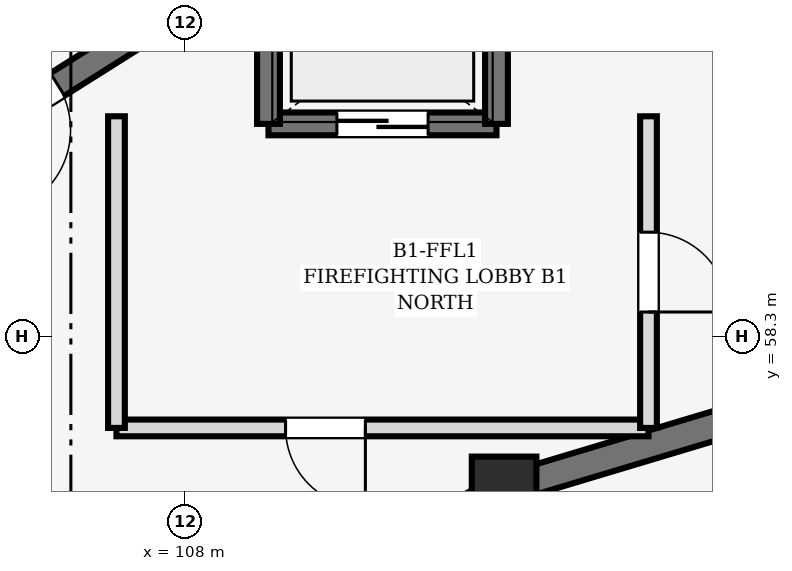
"""IFC4 building model, lengths in metres.
Left out: names, types, materials, properties, quantities, classifications, styles, units other than length and angle.
Written with IfcOpenShell. Run it as: python <this file> out.ifc"""

import sys

from ifc_helpers import new_model, si_unit, direction, frame, frame_2d, origin, origin_2d, place, context, subcontext, project, spatial, rectangle, extrude, element, fill, save


model = new_model("IFC4")
c1 = context("Model", 3, precision=1e-05, world=origin(), true_north=direction((0.0, 1.0)))
c2 = subcontext(c1, "Body", "Model", "MODEL_VIEW")
j1 = project(units=[si_unit("LENGTHUNIT", "METRE"), si_unit("PLANEANGLEUNIT", "RADIAN")], contexts=[c1])
p1 = place(None, origin())
s1 = spatial("IfcSite", under=j1, at=p1, CompositionType="ELEMENT")
p2 = place(p1, origin())
s2 = spatial("IfcBuilding", under=s1, at=p2, CompositionType="ELEMENT")
p3 = place(p2, frame((0.0, 0.0, -4.8)))
s3 = spatial("IfcBuildingStorey", under=s2, at=p3, CompositionType="ELEMENT", Elevation=-4.8)
p4 = place(p3, frame((112.2, 56.298, 0.0), z_axis=(0.0, 0.0, 1.0), x_axis=(1.0, 0.0, 0.0)))
e1 = element("IfcColumn", 1, at=p4, inside=s3, PredefinedType="COLUMN", context=c2, shape_type="SweptSolid", body=[
    extrude(rectangle(XDim=0.85, YDim=0.85, at=origin_2d()), origin(), (0.0, 0.0, 1.0), 4.8),
])
p5 = place(p3, frame((116.774, 57.67, 0.0), z_axis=(0.0, 0.0, 1.0), x_axis=(-0.957804976592, -0.287418904764, 0.0)))
e2 = element("IfcWall", 2, at=p5, inside=s3, PredefinedType="SOLIDWALL", context=c2, shape_type="SweptSolid", body=[
    extrude(rectangle(XDim=4.415, YDim=0.38, at=frame_2d((2.208, 0.0))), origin(), (0.0, 0.0, 1.0), 4.48),
])
p6 = place(p3, frame((111.885, 56.123, 0.0), z_axis=(0.0, 0.0, 1.0), x_axis=(-0.874000773635, -0.485924528795, 0.0)))
e3 = element("IfcWall", 3, at=p6, inside=s3, PredefinedType="SOLIDWALL", context=c2, shape_type="SweptSolid", body=[
    extrude(rectangle(XDim=3.975, YDim=0.38, at=frame_2d((1.987, 0.0))), origin(), (0.0, 0.0, 1.0), 4.48),
])
p7 = place(p6, frame((1.457, 0.0, 0.0)))
e4 = element("IfcOpeningElement", 4, at=p7, cuts=e3, PredefinedType="OPENING", context=c2, shape_type="SweptSolid", body=[
    extrude(rectangle(XDim=1.06, YDim=2.24, at=frame_2d((0.53, 1.12))), frame((0.0, 0.202, 0.0), z_axis=(0.0, -1.0, 0.0), x_axis=(1.0, 0.0, 0.0)), (0.0, 0.0, 1.0), 0.404),
])
p8 = place(p3, frame((108.346, 62.893, 0.0), z_axis=(0.0, 0.0, 1.0), x_axis=(-0.846151979506, -0.532941673712, 0.0)))
e5 = element("IfcWall", 5, at=p8, inside=s3, PredefinedType="SHEAR", context=c2, shape_type="SweptSolid", body=[
    extrude(rectangle(XDim=5.9, YDim=0.35, at=frame_2d((2.95, 0.0))), origin(), (0.0, 0.0, 1.0), 4.48),
])
p9 = place(p8, frame((2.39, 0.0, 0.0)))
e6 = element("IfcOpeningElement", 6, at=p9, cuts=e5, PredefinedType="OPENING", context=c2, shape_type="SweptSolid", body=[
    extrude(rectangle(XDim=1.12, YDim=2.26, at=frame_2d((0.56, 1.13))), frame((0.0, 0.187, 0.0), z_axis=(0.0, -1.0, 0.0), x_axis=(1.0, 0.0, 0.0)), (0.0, 0.0, 1.0), 0.374),
])
p10 = place(p3, frame((112.1, 61.1, 0.0), z_axis=(0.0, 0.0, 1.0), x_axis=(-1.0, 0.0, 0.0)))
e7 = element("IfcWall", 7, at=p10, inside=s3, PredefinedType="SHEAR", context=c2, shape_type="SweptSolid", body=[
    extrude(rectangle(XDim=3.0, YDim=0.3, at=frame_2d((1.5, 0.0))), origin(), (0.0, 0.0, 1.0), 4.5),
])
p11 = place(p10, frame((0.9, 0.0, 0.0)))
e8 = element("IfcOpeningElement", 8, at=p11, cuts=e7, PredefinedType="OPENING", context=c2, shape_type="SweptSolid", body=[
    extrude(rectangle(XDim=1.2, YDim=2.15, at=frame_2d((0.6, 1.075))), frame((0.0, 0.162, 0.0), z_axis=(0.0, -1.0, 0.0), x_axis=(1.0, 0.0, 0.0)), (0.0, 0.0, 1.0), 0.324),
])
p12 = place(p3, frame((112.1, 63.3, 0.0), z_axis=(0.0, 0.0, 1.0), x_axis=(0.0, -1.0, 0.0)))
e9 = element("IfcWall", 9, at=p12, inside=s3, PredefinedType="SHEAR", context=c2, shape_type="SweptSolid", body=[
    extrude(rectangle(XDim=2.2, YDim=0.3, at=frame_2d((1.1, 0.0))), origin(), (0.0, 0.0, 1.0), 4.5),
])
p13 = place(p3, frame((109.1, 61.1, 0.0), z_axis=(0.0, 0.0, 1.0), x_axis=(0.0, 1.0, 0.0)))
e10 = element("IfcWall", 10, at=p13, inside=s3, PredefinedType="SHEAR", context=c2, shape_type="SweptSolid", body=[
    extrude(rectangle(XDim=2.2, YDim=0.3, at=frame_2d((1.1, 0.0))), origin(), (0.0, 0.0, 1.0), 4.48),
])
p14 = place(p3, frame((114.1, 57.1, 0.0), z_axis=(0.0, 0.0, 1.0), x_axis=(-1.0, 0.0, 0.0)))
e11 = element("IfcWall", 11, at=p14, inside=s3, PredefinedType="SOLIDWALL", context=c2, shape_type="SweptSolid", body=[
    extrude(rectangle(XDim=7.0, YDim=0.22, at=frame_2d((3.5, 0.0))), origin(), (0.0, 0.0, 1.0), 4.485),
])
p15 = place(p14, frame((3.725, 0.0, 0.0)))
e12 = element("IfcOpeningElement", 12, at=p15, cuts=e11, PredefinedType="OPENING", context=c2, shape_type="SweptSolid", body=[
    extrude(rectangle(XDim=1.05, YDim=2.15, at=frame_2d((0.525, 1.075))), frame((0.0, 0.122, 0.0), z_axis=(0.0, -1.0, 0.0), x_axis=(1.0, 0.0, 0.0)), (0.0, 0.0, 1.0), 0.244),
])
p16 = place(p3, frame((107.1, 57.1, 0.0), z_axis=(0.0, 0.0, 1.0), x_axis=(0.0, 1.0, 0.0)))
e13 = element("IfcWall", 13, at=p16, inside=s3, PredefinedType="SOLIDWALL", context=c2, shape_type="SweptSolid", body=[
    extrude(rectangle(XDim=4.1, YDim=0.22, at=frame_2d((2.05, 0.0))), origin(), (0.0, 0.0, 1.0), 4.485),
])
p17 = place(p3, frame((114.1, 61.2, 0.0), z_axis=(0.0, 0.0, 1.0), x_axis=(0.0, -1.0, 0.0)))
e14 = element("IfcWall", 14, at=p17, inside=s3, PredefinedType="SOLIDWALL", context=c2, shape_type="SweptSolid", body=[
    extrude(rectangle(XDim=4.1, YDim=0.22, at=frame_2d((2.05, 0.0))), origin(), (0.0, 0.0, 1.0), 4.485),
])
p18 = place(p17, frame((1.525, 0.0, 0.0)))
e15 = element("IfcOpeningElement", 15, at=p18, cuts=e14, PredefinedType="OPENING", context=c2, shape_type="SweptSolid", body=[
    extrude(rectangle(XDim=1.05, YDim=2.15, at=frame_2d((0.525, 1.075))), frame((0.0, 0.122, 0.0), z_axis=(0.0, -1.0, 0.0), x_axis=(1.0, 0.0, 0.0)), (0.0, 0.0, 1.0), 0.244),
])
p19 = place(p11, origin())
e16 = element("IfcDoor", 16, at=p19, inside=s3, OperationType="DOUBLE_DOOR_SLIDING", PredefinedType="DOOR", context=c2, shape_type="SweptSolid", body=[
    extrude(rectangle(XDim=1.2, YDim=2.15, at=frame_2d((0.6, 1.075))), frame((0.0, 0.025, 0.0), z_axis=(0.0, -1.0, 0.0), x_axis=(1.0, 0.0, 0.0)), (0.0, 0.0, 1.0), 0.05),
])
fill(e8, e16)
p20 = place(p15, origin())
e17 = element("IfcDoor", 17, at=p20, inside=s3, OperationType="SINGLE_SWING_LEFT", PredefinedType="DOOR", context=c2, shape_type="SweptSolid", body=[
    extrude(rectangle(XDim=1.05, YDim=2.15, at=frame_2d((0.525, 1.075))), frame((0.0, 0.025, 0.0), z_axis=(0.0, -1.0, 0.0), x_axis=(1.0, 0.0, 0.0)), (0.0, 0.0, 1.0), 0.05),
])
fill(e12, e17)
p21 = place(p18, origin())
e18 = element("IfcDoor", 18, at=p21, inside=s3, OperationType="SINGLE_SWING_RIGHT", PredefinedType="DOOR", context=c2, shape_type="SweptSolid", body=[
    extrude(rectangle(XDim=1.05, YDim=2.15, at=frame_2d((0.525, 1.075))), frame((0.0, 0.025, 0.0), z_axis=(0.0, -1.0, 0.0), x_axis=(1.0, 0.0, 0.0)), (0.0, 0.0, 1.0), 0.05),
])
fill(e15, e18)
p22 = place(p9, origin())
e19 = element("IfcDoor", 19, at=p22, inside=s3, OperationType="SINGLE_SWING_RIGHT", PredefinedType="DOOR", context=c2, shape_type="SweptSolid", body=[
    extrude(rectangle(XDim=1.12, YDim=2.26, at=frame_2d((0.56, 1.13))), frame((0.0, 0.025, 0.0), z_axis=(0.0, -1.0, 0.0), x_axis=(1.0, 0.0, 0.0)), (0.0, 0.0, 1.0), 0.05),
])
fill(e6, e19)
save(model, sys.argv[1])
